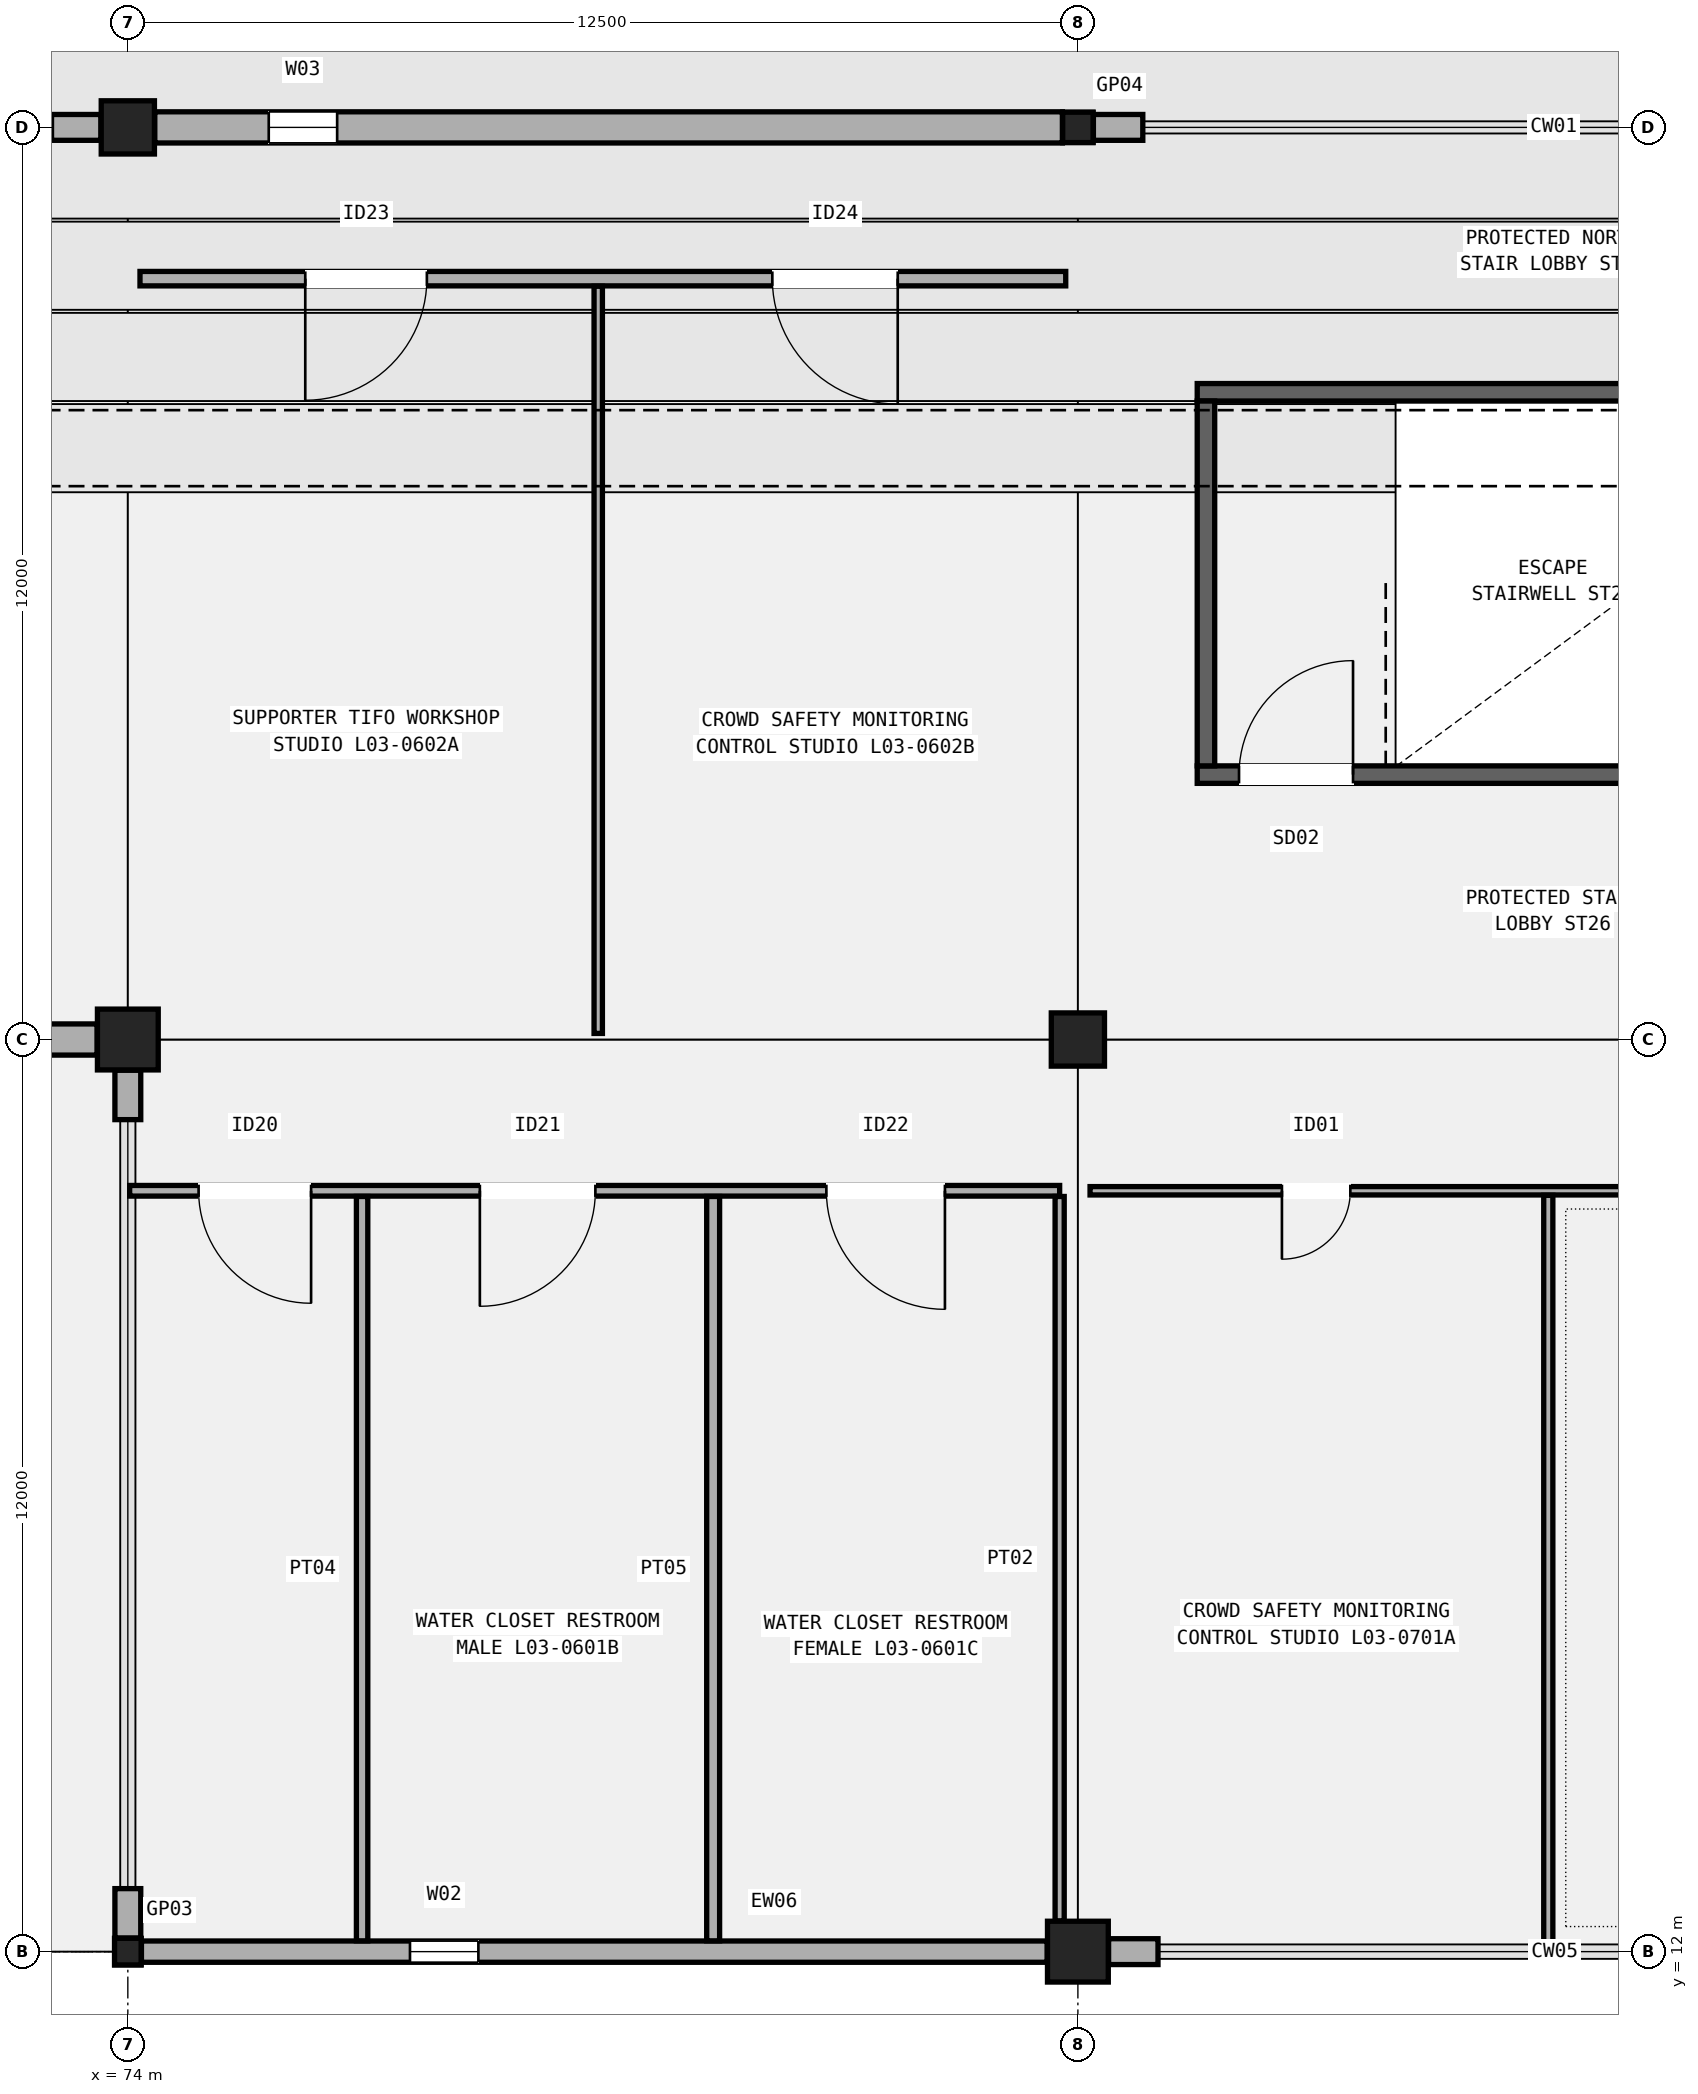
"""IFC4 building model, lengths in metres.
Left out: names, types, materials, properties, quantities, classifications, styles, units other than length and angle.
Written with IfcOpenShell. Run it as: python <this file> out.ifc"""

import sys

from ifc_helpers import new_model, si_unit, direction, frame, frame_2d, origin, origin_2d, place, context, subcontext, project, spatial, rectangle, hollow_rectangle, extrude, element, fill, save


model = new_model("IFC4")
c1 = context("Model", 3, precision=1e-05, world=origin(), true_north=direction((0.0, 1.0)))
c2 = subcontext(c1, "Body", "Model", "MODEL_VIEW")
j1 = project(units=[si_unit("LENGTHUNIT", "METRE"), si_unit("PLANEANGLEUNIT", "RADIAN")], contexts=[c1])
p1 = place(None, origin())
s1 = spatial("IfcSite", under=j1, at=p1, CompositionType="ELEMENT")
p2 = place(p1, origin())
s2 = spatial("IfcBuilding", under=s1, at=p2, CompositionType="ELEMENT")
p3 = place(p2, frame((0.0, 0.0, 15.3)))
s3 = spatial("IfcBuildingStorey", under=s2, at=p3, CompositionType="ELEMENT", Elevation=15.3)
p4 = place(p3, frame((74.0, 12.0, 0.0), z_axis=(0.0, 0.0, 1.0), x_axis=(1.0, 0.0, 0.0)))
e1 = element("IfcColumn", 1, at=p4, inside=s3, PredefinedType="COLUMN", context=c2, shape_type="SweptSolid", body=[
    extrude(hollow_rectangle(XDim=0.35, YDim=0.35, WallThickness=0.016, InnerFilletRadius=0.016, OuterFilletRadius=0.032, at=origin_2d()), origin(), (0.0, 0.0, 1.0), 5.1),
])
p5 = place(p3, frame((74.0, 24.0, 0.0), z_axis=(0.0, 0.0, 1.0), x_axis=(1.0, 0.0, 0.0)))
e2 = element("IfcColumn", 2, at=p5, inside=s3, PredefinedType="COLUMN", context=c2, shape_type="SweptSolid", body=[
    extrude(rectangle(XDim=0.8, YDim=0.8, at=origin_2d()), origin(), (0.0, 0.0, 1.0), 5.1),
])
p6 = place(p3, frame((74.0, 36.0, 0.0), z_axis=(0.0, 0.0, 1.0), x_axis=(1.0, 0.0, 0.0)))
e3 = element("IfcColumn", 3, at=p6, inside=s3, PredefinedType="COLUMN", context=c2, shape_type="SweptSolid", body=[
    extrude(rectangle(XDim=0.7, YDim=0.7, at=origin_2d()), origin(), (0.0, 0.0, 1.0), 5.1),
])
p7 = place(p3, frame((86.5, 12.0, 0.0), z_axis=(0.0, 0.0, 1.0), x_axis=(1.0, 0.0, 0.0)))
e4 = element("IfcColumn", 4, at=p7, inside=s3, PredefinedType="COLUMN", context=c2, shape_type="SweptSolid", body=[
    extrude(rectangle(XDim=0.8, YDim=0.8, at=origin_2d()), origin(), (0.0, 0.0, 1.0), 5.1),
])
p8 = place(p3, frame((86.5, 24.0, 0.0), z_axis=(0.0, 0.0, 1.0), x_axis=(1.0, 0.0, 0.0)))
e5 = element("IfcColumn", 5, at=p8, inside=s3, PredefinedType="COLUMN", context=c2, shape_type="SweptSolid", body=[
    extrude(rectangle(XDim=0.7, YDim=0.7, at=origin_2d()), origin(), (0.0, 0.0, 1.0), 5.1),
])
p9 = place(p3, frame((86.5, 36.0, 0.0), z_axis=(0.0, 0.0, 1.0), x_axis=(1.0, 0.0, 0.0)))
e6 = element("IfcColumn", 6, at=p9, inside=s3, PredefinedType="COLUMN", context=c2, shape_type="SweptSolid", body=[
    extrude(hollow_rectangle(XDim=0.4, YDim=0.4, WallThickness=0.016, InnerFilletRadius=0.016, OuterFilletRadius=0.032, at=origin_2d()), origin(), (0.0, 0.0, 1.0), 5.1),
])
p10 = place(p3, frame((61.679, 24.0, 0.0), z_axis=(0.0, 0.0, 1.0), x_axis=(1.0, 0.0, 0.0)))
e7 = element("IfcWall", 7, at=p10, inside=s3, PredefinedType="SOLIDWALL", context=c2, shape_type="SweptSolid", body=[
    extrude(rectangle(XDim=11.917, YDim=0.41, at=frame_2d((5.958, 0.0))), origin(), (0.0, 0.0, 1.0), 4.16),
])
p11 = place(p10, frame((1.5, 0.0, 0.95)))
e8 = element("IfcOpeningElement", 8, at=p11, cuts=e7, PredefinedType="OPENING", context=c2, shape_type="SweptSolid", body=[
    extrude(rectangle(XDim=3.6, YDim=1.75, at=frame_2d((1.8, 0.875))), frame((0.0, 0.215, 0.0), z_axis=(0.0, -1.0, 0.0), x_axis=(1.0, 0.0, 0.0)), (0.0, 0.0, 1.0), 0.43),
])
p12 = place(p3, frame((72.996, 36.0, 0.0), z_axis=(0.0, 0.0, 1.0), x_axis=(1.0, 0.0, 0.0)))
e9 = element("IfcWall", 9, at=p12, inside=s3, PredefinedType="SOLIDWALL", context=c2, shape_type="SweptSolid", body=[
    extrude(rectangle(XDim=0.65, YDim=0.34, at=frame_2d((0.325, 0.0))), origin(), (0.0, 0.0, 1.0), 4.172),
])
p13 = place(p3, frame((74.179, 12.0, 0.0), z_axis=(0.0, 0.0, 1.0), x_axis=(1.0, 0.0, 0.0)))
e10 = element("IfcWall", 10, at=p13, inside=s3, PredefinedType="SOLIDWALL", context=c2, shape_type="SweptSolid", body=[
    extrude(rectangle(XDim=11.917, YDim=0.28, at=frame_2d((5.958, 0.0))), origin(), (0.0, 0.0, 1.0), 4.16),
])
p14 = place(p13, frame((3.533, 0.0, 0.95)))
e11 = element("IfcOpeningElement", 11, at=p14, cuts=e10, PredefinedType="OPENING", context=c2, shape_type="SweptSolid", body=[
    extrude(rectangle(XDim=0.9, YDim=2.4, at=frame_2d((0.45, 1.2))), frame((0.0, 0.15, 0.0), z_axis=(0.0, -1.0, 0.0), x_axis=(1.0, 0.0, 0.0)), (0.0, 0.0, 1.0), 0.3),
])
p15 = place(p3, frame((74.0, 12.179, 0.0), z_axis=(0.0, 0.0, 1.0), x_axis=(0.0, 1.0, 0.0)))
e12 = element("IfcWall", 12, at=p15, inside=s3, PredefinedType="SOLIDWALL", context=c2, shape_type="SweptSolid", body=[
    extrude(rectangle(XDim=0.65, YDim=0.34, at=frame_2d((0.325, 0.0))), origin(), (0.0, 0.0, 1.0), 4.16),
])
p16 = place(p3, frame((74.0, 22.946, 0.0), z_axis=(0.0, 0.0, 1.0), x_axis=(0.0, 1.0, 0.0)))
e13 = element("IfcWall", 13, at=p16, inside=s3, PredefinedType="SOLIDWALL", context=c2, shape_type="SweptSolid", body=[
    extrude(rectangle(XDim=0.65, YDim=0.34, at=frame_2d((0.325, 0.0))), origin(), (0.0, 0.0, 1.0), 4.16),
])
p17 = place(p3, frame((74.354, 36.0, 0.0), z_axis=(0.0, 0.0, 1.0), x_axis=(1.0, 0.0, 0.0)))
e14 = element("IfcWall", 14, at=p17, inside=s3, PredefinedType="SOLIDWALL", context=c2, shape_type="SweptSolid", body=[
    extrude(rectangle(XDim=11.942, YDim=0.41, at=frame_2d((5.971, 0.0))), origin(), (0.0, 0.0, 1.0), 4.06),
])
p18 = place(p17, frame((1.5, 0.0, 0.95)))
e15 = element("IfcOpeningElement", 15, at=p18, cuts=e14, PredefinedType="OPENING", context=c2, shape_type="SweptSolid", body=[
    extrude(rectangle(XDim=0.9, YDim=2.7, at=frame_2d((0.45, 1.35))), frame((0.0, 0.215, 0.0), z_axis=(0.0, -1.0, 0.0), x_axis=(1.0, 0.0, 0.0)), (0.0, 0.0, 1.0), 0.43),
])
p19 = place(p3, frame((86.904, 12.0, 0.0), z_axis=(0.0, 0.0, 1.0), x_axis=(1.0, 0.0, 0.0)))
e16 = element("IfcWall", 16, at=p19, inside=s3, PredefinedType="SOLIDWALL", context=c2, shape_type="SweptSolid", body=[
    extrude(rectangle(XDim=0.65, YDim=0.34, at=frame_2d((0.325, 0.0))), origin(), (0.0, 0.0, 1.0), 4.172),
])
p20 = place(p3, frame((86.704, 36.0, 0.0), z_axis=(0.0, 0.0, 1.0), x_axis=(1.0, 0.0, 0.0)))
e17 = element("IfcWall", 17, at=p20, inside=s3, PredefinedType="SOLIDWALL", context=c2, shape_type="SweptSolid", body=[
    extrude(rectangle(XDim=0.65, YDim=0.34, at=frame_2d((0.325, 0.0))), origin(), (0.0, 0.0, 1.0), 4.16),
])
p21 = place(p3, frame((88.07, 27.485, 0.0), z_axis=(0.0, 0.0, 1.0), x_axis=(1.0, 0.0, 0.0)))
e18 = element("IfcWall", 18, at=p21, inside=s3, PredefinedType="SHEAR", context=c2, shape_type="SweptSolid", body=[
    extrude(rectangle(XDim=9.36, YDim=0.23, at=frame_2d((4.68, 0.0))), origin(), (0.0, 0.0, 1.0), 4.86),
])
p22 = place(p21, frame((0.55, 0.0, 0.0)))
e19 = element("IfcOpeningElement", 19, at=p22, cuts=e18, PredefinedType="OPENING", context=c2, shape_type="SweptSolid", body=[
    extrude(rectangle(XDim=1.5, YDim=2.2, at=frame_2d((0.75, 1.1))), frame((0.0, 0.125, 0.0), z_axis=(0.0, -1.0, 0.0), x_axis=(1.0, 0.0, 0.0)), (0.0, 0.0, 1.0), 0.25),
])
p23 = place(p3, frame((88.07, 32.515, 0.0), z_axis=(0.0, 0.0, 1.0), x_axis=(1.0, 0.0, 0.0)))
e20 = element("IfcWall", 20, at=p23, inside=s3, PredefinedType="SHEAR", context=c2, shape_type="SweptSolid", body=[
    extrude(rectangle(XDim=9.36, YDim=0.23, at=frame_2d((4.68, 0.0))), origin(), (0.0, 0.0, 1.0), 4.86),
])
p24 = place(p3, frame((88.185, 27.6, 0.0), z_axis=(0.0, 0.0, 1.0), x_axis=(0.0, 1.0, 0.0)))
e21 = element("IfcWall", 21, at=p24, inside=s3, PredefinedType="SHEAR", context=c2, shape_type="SweptSolid", body=[
    extrude(rectangle(XDim=4.8, YDim=0.23, at=frame_2d((2.4, 0.0))), origin(), (0.0, 0.0, 1.0), 4.86),
])
p25 = place(p3, frame((74.024, 22.01, 0.0), z_axis=(0.0, 0.0, 1.0), x_axis=(1.0, 0.0, 0.0)))
e22 = element("IfcWall", 22, at=p25, inside=s3, PredefinedType="PARTITIONING", context=c2, shape_type="SweptSolid", body=[
    extrude(rectangle(XDim=12.236, YDim=0.14, at=frame_2d((6.118, 0.0))), origin(), (0.0, 0.0, 1.0), 4.22),
])
p26 = place(p25, frame((2.387, 0.0, 0.0), z_axis=(0.0, 0.0, 1.0), x_axis=(-1.0, 0.0, 0.0)))
e23 = element("IfcOpeningElement", 23, at=p26, cuts=e22, PredefinedType="OPENING", context=c2, shape_type="SweptSolid", body=[
    extrude(rectangle(XDim=1.48, YDim=2.24, at=frame_2d((0.74, 1.12))), frame((0.0, 0.08, 0.0), z_axis=(0.0, -1.0, 0.0), x_axis=(1.0, 0.0, 0.0)), (0.0, 0.0, 1.0), 0.16),
])
p27 = place(p25, frame((6.128, 0.0, 0.0), z_axis=(0.0, 0.0, 1.0), x_axis=(-1.0, 0.0, 0.0)))
e24 = element("IfcOpeningElement", 24, at=p27, cuts=e22, PredefinedType="OPENING", context=c2, shape_type="SweptSolid", body=[
    extrude(rectangle(XDim=1.52, YDim=2.28, at=frame_2d((0.76, 1.14))), frame((0.0, 0.08, 0.0), z_axis=(0.0, -1.0, 0.0), x_axis=(1.0, 0.0, 0.0)), (0.0, 0.0, 1.0), 0.16),
])
p28 = place(p25, frame((10.727, 0.0, 0.0), z_axis=(0.0, 0.0, 1.0), x_axis=(-1.0, 0.0, 0.0)))
e25 = element("IfcOpeningElement", 25, at=p28, cuts=e22, PredefinedType="OPENING", context=c2, shape_type="SweptSolid", body=[
    extrude(rectangle(XDim=1.56, YDim=2.26, at=frame_2d((0.78, 1.13))), frame((0.0, 0.08, 0.0), z_axis=(0.0, -1.0, 0.0), x_axis=(1.0, 0.0, 0.0)), (0.0, 0.0, 1.0), 0.16),
])
p29 = place(p3, frame((86.26, 12.404, 0.0), z_axis=(0.0, 0.0, 1.0), x_axis=(0.0, 1.0, 0.0)))
e26 = element("IfcWall", 26, at=p29, inside=s3, PredefinedType="PARTITIONING", context=c2, shape_type="SweptSolid", body=[
    extrude(rectangle(XDim=9.531, YDim=0.12, at=frame_2d((4.766, 0.0))), origin(), (0.0, 0.0, 1.0), 4.132),
])
p30 = place(p3, frame((77.082, 12.142, 0.0), z_axis=(0.0, 0.0, 1.0), x_axis=(0.0, 1.0, 0.0)))
e27 = element("IfcWall", 27, at=p30, inside=s3, PredefinedType="PARTITIONING", context=c2, shape_type="SweptSolid", body=[
    extrude(rectangle(XDim=9.793, YDim=0.15, at=frame_2d((4.896, 0.0))), origin(), (0.0, 0.0, 1.0), 4.22),
])
p31 = place(p3, frame((81.701, 12.142, 0.0), z_axis=(0.0, 0.0, 1.0), x_axis=(0.0, 1.0, 0.0)))
e28 = element("IfcWall", 28, at=p31, inside=s3, PredefinedType="PARTITIONING", context=c2, shape_type="SweptSolid", body=[
    extrude(rectangle(XDim=9.793, YDim=0.17, at=frame_2d((4.896, 0.0))), origin(), (0.0, 0.0, 1.0), 4.22),
])
p32 = place(p3, frame((74.16, 34.01, 0.0), z_axis=(0.0, 0.0, 1.0), x_axis=(1.0, 0.0, 0.0)))
e29 = element("IfcWall", 29, at=p32, inside=s3, PredefinedType="PARTITIONING", context=c2, shape_type="SweptSolid", body=[
    extrude(rectangle(XDim=12.18, YDim=0.19, at=frame_2d((6.09, 0.0))), origin(), (0.0, 0.0, 1.0), 2.77),
])
p33 = place(p32, frame((3.775, 0.0, 0.0), z_axis=(0.0, 0.0, 1.0), x_axis=(-1.0, 0.0, 0.0)))
e30 = element("IfcOpeningElement", 30, at=p33, cuts=e29, PredefinedType="OPENING", context=c2, shape_type="SweptSolid", body=[
    extrude(rectangle(XDim=1.6, YDim=2.3, at=frame_2d((0.8, 1.15))), frame((0.0, 0.105, 0.0), z_axis=(0.0, -1.0, 0.0), x_axis=(1.0, 0.0, 0.0)), (0.0, 0.0, 1.0), 0.21),
])
p34 = place(p32, frame((9.969, 0.0, 0.0), z_axis=(0.0, 0.0, 1.0), x_axis=(-1.0, 0.0, 0.0)))
e31 = element("IfcOpeningElement", 31, at=p34, cuts=e29, PredefinedType="OPENING", context=c2, shape_type="SweptSolid", body=[
    extrude(rectangle(XDim=1.65, YDim=2.28, at=frame_2d((0.825, 1.14))), frame((0.0, 0.105, 0.0), z_axis=(0.0, -1.0, 0.0), x_axis=(1.0, 0.0, 0.0)), (0.0, 0.0, 1.0), 0.21),
])
p35 = place(p3, frame((80.189, 24.08, 0.0), z_axis=(0.0, 0.0, 1.0), x_axis=(0.0, 1.0, 0.0)))
e32 = element("IfcWall", 32, at=p35, inside=s3, PredefinedType="PARTITIONING", context=c2, shape_type="SweptSolid", body=[
    extrude(rectangle(XDim=9.83, YDim=0.11, at=frame_2d((4.915, 0.0))), origin(), (0.0, 0.0, 1.0), 2.77),
])
p36 = place(p3, frame((86.66, 22.01, 0.0), z_axis=(0.0, 0.0, 1.0), x_axis=(1.0, 0.0, 0.0)))
e33 = element("IfcWall", 33, at=p36, inside=s3, PredefinedType="PARTITIONING", context=c2, shape_type="SweptSolid", body=[
    extrude(rectangle(XDim=12.198, YDim=0.11, at=frame_2d((6.099, 0.0))), origin(), (0.0, 0.0, 1.0), 4.22),
])
p37 = place(p36, frame((3.424, 0.0, 0.0), z_axis=(0.0, 0.0, 1.0), x_axis=(-1.0, 0.0, 0.0)))
e34 = element("IfcOpeningElement", 34, at=p37, cuts=e33, PredefinedType="OPENING", context=c2, shape_type="SweptSolid", body=[
    extrude(rectangle(XDim=0.9, YDim=2.06, at=frame_2d((0.45, 1.03))), frame((0.0, 0.065, 0.0), z_axis=(0.0, -1.0, 0.0), x_axis=(1.0, 0.0, 0.0)), (0.0, 0.0, 1.0), 0.13),
])
p38 = place(p36, frame((9.604, 0.0, 0.0), z_axis=(0.0, 0.0, 1.0), x_axis=(-1.0, 0.0, 0.0)))
e35 = element("IfcOpeningElement", 35, at=p38, cuts=e33, PredefinedType="OPENING", context=c2, shape_type="SweptSolid", body=[
    extrude(rectangle(XDim=0.92, YDim=2.1, at=frame_2d((0.46, 1.05))), frame((0.0, 0.065, 0.0), z_axis=(0.0, -1.0, 0.0), x_axis=(1.0, 0.0, 0.0)), (0.0, 0.0, 1.0), 0.13),
])
p39 = place(p3, frame((92.689, 12.024, 0.0), z_axis=(0.0, 0.0, 1.0), x_axis=(0.0, 1.0, 0.0)))
e36 = element("IfcWall", 36, at=p39, inside=s3, PredefinedType="PARTITIONING", context=c2, shape_type="SweptSolid", body=[
    extrude(rectangle(XDim=9.926, YDim=0.12, at=frame_2d((4.963, 0.0))), origin(), (0.0, 0.0, 1.0), 4.22),
])
p40 = place(p14, origin())
e37 = element("IfcWindow", 37, at=p40, inside=s3, PartitioningType="SINGLE_PANEL", PredefinedType="WINDOW", context=c2, shape_type="SweptSolid", body=[
    extrude(rectangle(XDim=0.9, YDim=2.4, at=frame_2d((0.45, 1.2))), frame((0.0, 0.03, 0.0), z_axis=(0.0, -1.0, 0.0), x_axis=(1.0, 0.0, 0.0)), (0.0, 0.0, 1.0), 0.06),
])
fill(e11, e37)
p41 = place(p18, origin())
e38 = element("IfcWindow", 38, at=p41, inside=s3, PartitioningType="SINGLE_PANEL", PredefinedType="WINDOW", context=c2, shape_type="SweptSolid", body=[
    extrude(rectangle(XDim=0.9, YDim=2.7, at=frame_2d((0.45, 1.35))), frame((0.0, 0.03, 0.0), z_axis=(0.0, -1.0, 0.0), x_axis=(1.0, 0.0, 0.0)), (0.0, 0.0, 1.0), 0.06),
])
fill(e15, e38)
p42 = place(p22, origin())
e39 = element("IfcDoor", 39, at=p42, inside=s3, OperationType="SINGLE_SWING_RIGHT", PredefinedType="DOOR", context=c2, shape_type="SweptSolid", body=[
    extrude(rectangle(XDim=1.5, YDim=2.2, at=frame_2d((0.75, 1.1))), frame((0.0, 0.025, 0.0), z_axis=(0.0, -1.0, 0.0), x_axis=(1.0, 0.0, 0.0)), (0.0, 0.0, 1.0), 0.05),
])
fill(e19, e39)
p43 = place(p26, origin())
e40 = element("IfcDoor", 40, at=p43, inside=s3, OperationType="SINGLE_SWING_LEFT", PredefinedType="DOOR", context=c2, shape_type="SweptSolid", body=[
    extrude(rectangle(XDim=1.48, YDim=2.24, at=frame_2d((0.74, 1.12))), frame((0.0, 0.025, 0.0), z_axis=(0.0, -1.0, 0.0), x_axis=(1.0, 0.0, 0.0)), (0.0, 0.0, 1.0), 0.05),
])
fill(e23, e40)
p44 = place(p27, origin())
e41 = element("IfcDoor", 41, at=p44, inside=s3, OperationType="SINGLE_SWING_RIGHT", PredefinedType="DOOR", context=c2, shape_type="SweptSolid", body=[
    extrude(rectangle(XDim=1.52, YDim=2.28, at=frame_2d((0.76, 1.14))), frame((0.0, 0.025, 0.0), z_axis=(0.0, -1.0, 0.0), x_axis=(1.0, 0.0, 0.0)), (0.0, 0.0, 1.0), 0.05),
])
fill(e24, e41)
p45 = place(p28, origin())
e42 = element("IfcDoor", 42, at=p45, inside=s3, OperationType="SINGLE_SWING_LEFT", PredefinedType="DOOR", context=c2, shape_type="SweptSolid", body=[
    extrude(rectangle(XDim=1.56, YDim=2.26, at=frame_2d((0.78, 1.13))), frame((0.0, 0.025, 0.0), z_axis=(0.0, -1.0, 0.0), x_axis=(1.0, 0.0, 0.0)), (0.0, 0.0, 1.0), 0.05),
])
fill(e25, e42)
p46 = place(p33, origin())
e43 = element("IfcDoor", 43, at=p46, inside=s3, OperationType="SINGLE_SWING_RIGHT", PredefinedType="DOOR", context=c2, shape_type="SweptSolid", body=[
    extrude(rectangle(XDim=1.6, YDim=2.3, at=frame_2d((0.8, 1.15))), frame((0.0, 0.025, 0.0), z_axis=(0.0, -1.0, 0.0), x_axis=(1.0, 0.0, 0.0)), (0.0, 0.0, 1.0), 0.05),
])
fill(e30, e43)
p47 = place(p34, origin())
e44 = element("IfcDoor", 44, at=p47, inside=s3, OperationType="SINGLE_SWING_LEFT", PredefinedType="DOOR", context=c2, shape_type="SweptSolid", body=[
    extrude(rectangle(XDim=1.65, YDim=2.28, at=frame_2d((0.825, 1.14))), frame((0.0, 0.025, 0.0), z_axis=(0.0, -1.0, 0.0), x_axis=(1.0, 0.0, 0.0)), (0.0, 0.0, 1.0), 0.05),
])
fill(e31, e44)
p48 = place(p37, origin())
e45 = element("IfcDoor", 45, at=p48, inside=s3, OperationType="SINGLE_SWING_RIGHT", PredefinedType="DOOR", context=c2, shape_type="SweptSolid", body=[
    extrude(rectangle(XDim=0.9, YDim=2.06, at=frame_2d((0.45, 1.03))), frame((0.0, 0.025, 0.0), z_axis=(0.0, -1.0, 0.0), x_axis=(1.0, 0.0, 0.0)), (0.0, 0.0, 1.0), 0.05),
])
fill(e34, e45)
save(model, sys.argv[1])
